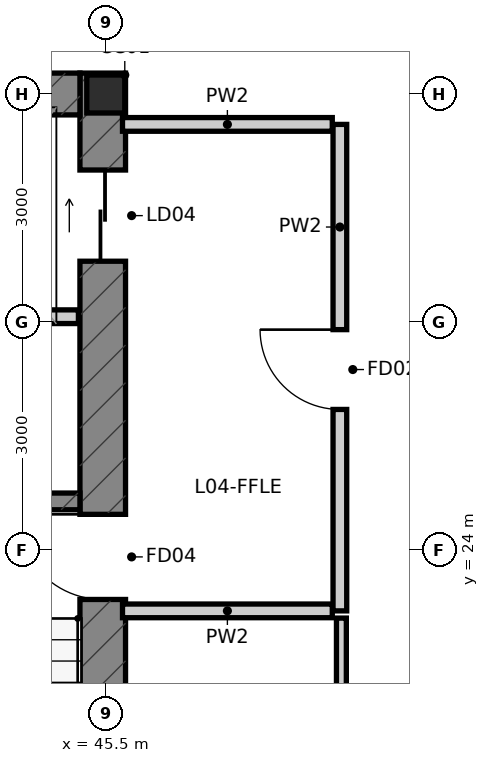
"""IFC4 building model, lengths in metres.
Left out: names, types, materials, properties, quantities, classifications, styles, units other than length and angle.
Written with IfcOpenShell. Run it as: python <this file> out.ifc"""

import sys

from ifc_helpers import new_model, si_unit, direction, frame, frame_2d, origin, origin_2d, place, context, subcontext, project, spatial, rectangle, i_section, extrude, source, transform, mapped, element, fill, save


model = new_model("IFC4")
c1 = context("Model", 3, precision=1e-05, world=origin(), true_north=direction((0.0, 1.0)))
c2 = subcontext(c1, "Body", "Model", "MODEL_VIEW")
j1 = project(units=[si_unit("LENGTHUNIT", "METRE"), si_unit("PLANEANGLEUNIT", "RADIAN")], contexts=[c1])
p1 = place(None, origin())
s1 = spatial("IfcSite", under=j1, at=p1, CompositionType="ELEMENT")
p2 = place(p1, origin())
s2 = spatial("IfcBuilding", under=s1, at=p2, CompositionType="ELEMENT")
p3 = place(p2, frame((0.0, 0.0, 18.9)))
s3 = spatial("IfcBuildingStorey", under=s2, at=p3, CompositionType="ELEMENT", Elevation=18.9)
m1 = source(origin(), c2, "Body", "SweptSolid", [
    extrude(i_section(OverallWidth=0.5, OverallDepth=0.5, WebThickness=0.028, FlangeThickness=0.04, at=origin_2d()), origin(), (0.0, 0.0, 1.0), 4.2),
])
p4 = place(p3, frame((45.5, 30.0, 0.0), z_axis=(0.0, 0.0, 1.0), x_axis=(1.0, 0.0, 0.0)))
e1 = element("IfcColumn", 1, at=p4, inside=s3, PredefinedType="COLUMN", context=c2, shape_type="MappedRepresentation", body=[
    mapped(m1, transform((0.0, 0.0, 0.0), scale=1.0)),
])
p5 = place(p3, frame((45.46, 16.85, 0.0), z_axis=(0.0, 0.0, 1.0), x_axis=(0.0, 1.0, 0.0)))
e2 = element("IfcWall", 2, at=p5, inside=s3, PredefinedType="SHEAR", context=c2, shape_type="SweptSolid", body=[
    extrude(rectangle(XDim=13.425, YDim=0.6, at=frame_2d((6.712, 0.0))), origin(), (0.0, 0.0, 1.0), 4.2),
])
p6 = place(p5, frame((6.5, 0.0, 0.0)))
e3 = element("IfcOpeningElement", 3, at=p6, cuts=e2, PredefinedType="OPENING", context=c2, shape_type="SweptSolid", body=[
    extrude(rectangle(XDim=1.12, YDim=2.15, at=frame_2d((0.56, 1.075))), frame((0.0, 0.312, 0.0), z_axis=(0.0, -1.0, 0.0), x_axis=(1.0, 0.0, 0.0)), (0.0, 0.0, 1.0), 0.624),
])
p7 = place(p5, frame((10.95, 0.0, 0.0)))
e4 = element("IfcOpeningElement", 4, at=p7, cuts=e2, PredefinedType="OPENING", context=c2, shape_type="SweptSolid", body=[
    extrude(rectangle(XDim=1.2, YDim=2.2, at=frame_2d((0.6, 1.1))), frame((0.0, 0.312, 0.0), z_axis=(0.0, -1.0, 0.0), x_axis=(1.0, 0.0, 0.0)), (0.0, 0.0, 1.0), 0.624),
])
p8 = place(p3, frame((42.26, 30.0, 0.0), z_axis=(0.0, 0.0, 1.0), x_axis=(1.0, 0.0, 0.0)))
e5 = element("IfcWall", 5, at=p8, inside=s3, PredefinedType="SHEAR", context=c2, shape_type="SweptSolid", body=[
    extrude(rectangle(XDim=2.9, YDim=0.55, at=frame_2d((1.45, 0.0))), origin(), (0.0, 0.0, 1.0), 4.2),
])
p9 = place(p3, frame((42.26, 24.64, 0.0), z_axis=(0.0, 0.0, 1.0), x_axis=(1.0, 0.0, 0.0)))
e6 = element("IfcWall", 6, at=p9, inside=s3, PredefinedType="SHEAR", context=c2, shape_type="SweptSolid", body=[
    extrude(rectangle(XDim=2.9, YDim=0.22, at=frame_2d((1.45, 0.0))), origin(), (0.0, 0.0, 1.0), 4.2),
])
p10 = place(p3, frame((48.58, 23.2, 0.0), z_axis=(0.0, 0.0, 1.0), x_axis=(0.0, 1.0, 0.0)))
e7 = element("IfcWall", 7, at=p10, inside=s3, PredefinedType="PARTITIONING", context=c2, shape_type="SweptSolid", body=[
    extrude(rectangle(XDim=6.4, YDim=0.18, at=frame_2d((3.2, 0.0))), origin(), (0.0, 0.0, 1.0), 3.75),
])
p11 = place(p10, frame((2.65, 0.0, 0.0)))
e8 = element("IfcOpeningElement", 8, at=p11, cuts=e7, PredefinedType="OPENING", context=c2, shape_type="SweptSolid", body=[
    extrude(rectangle(XDim=1.05, YDim=2.15, at=frame_2d((0.525, 1.075))), frame((0.0, 0.102, 0.0), z_axis=(0.0, -1.0, 0.0), x_axis=(1.0, 0.0, 0.0)), (0.0, 0.0, 1.0), 0.204),
])
p12 = place(p3, frame((45.72, 23.2, 0.0), z_axis=(0.0, 0.0, 1.0), x_axis=(1.0, 0.0, 0.0)))
e9 = element("IfcWall", 9, at=p12, inside=s3, PredefinedType="PARTITIONING", context=c2, shape_type="SweptSolid", body=[
    extrude(rectangle(XDim=2.76, YDim=0.18, at=frame_2d((1.38, 0.0))), origin(), (0.0, 0.0, 1.0), 3.75),
])
p13 = place(p3, frame((45.72, 29.6, 0.0), z_axis=(0.0, 0.0, 1.0), x_axis=(1.0, 0.0, 0.0)))
e10 = element("IfcWall", 10, at=p13, inside=s3, PredefinedType="PARTITIONING", context=c2, shape_type="SweptSolid", body=[
    extrude(rectangle(XDim=2.76, YDim=0.18, at=frame_2d((1.38, 0.0))), origin(), (0.0, 0.0, 1.0), 3.124),
])
p14 = place(p3, frame((42.24, 27.07, 0.0), z_axis=(0.0, 0.0, 1.0), x_axis=(1.0, 0.0, 0.0)))
e11 = element("IfcWall", 11, at=p14, inside=s3, PredefinedType="PARTITIONING", context=c2, shape_type="SweptSolid", body=[
    extrude(rectangle(XDim=2.9, YDim=0.18, at=frame_2d((1.45, 0.0))), origin(), (0.0, 0.0, 1.0), 3.75),
])
p15 = place(p3, frame((48.6, 14.355, 0.0), z_axis=(0.0, 0.0, 1.0), x_axis=(0.0, 1.0, 0.0)))
e12 = element("IfcWall", 12, at=p15, inside=s3, PredefinedType="PARTITIONING", context=c2, shape_type="SweptSolid", body=[
    extrude(rectangle(XDim=8.75, YDim=0.13, at=frame_2d((4.375, 0.0))), origin(), (0.0, 0.0, 1.0), 3.75),
])
p16 = place(p6, origin())
e13 = element("IfcDoor", 13, at=p16, inside=s3, OperationType="SINGLE_SWING_RIGHT", PredefinedType="DOOR", context=c2, shape_type="SweptSolid", body=[
    extrude(rectangle(XDim=1.12, YDim=2.15, at=frame_2d((0.56, 1.075))), frame((0.0, 0.025, 0.0), z_axis=(0.0, -1.0, 0.0), x_axis=(1.0, 0.0, 0.0)), (0.0, 0.0, 1.0), 0.05),
])
fill(e3, e13)
p17 = place(p7, origin())
e14 = element("IfcDoor", 14, at=p17, inside=s3, OperationType="SLIDING_TO_RIGHT", PredefinedType="DOOR", context=c2, shape_type="SweptSolid", body=[
    extrude(rectangle(XDim=1.2, YDim=2.2, at=frame_2d((0.6, 1.1))), frame((0.0, 0.025, 0.0), z_axis=(0.0, -1.0, 0.0), x_axis=(1.0, 0.0, 0.0)), (0.0, 0.0, 1.0), 0.05),
])
fill(e4, e14)
p18 = place(p11, origin())
e15 = element("IfcDoor", 15, at=p18, inside=s3, OperationType="SINGLE_SWING_RIGHT", PredefinedType="DOOR", context=c2, shape_type="SweptSolid", body=[
    extrude(rectangle(XDim=1.05, YDim=2.15, at=frame_2d((0.525, 1.075))), frame((0.0, 0.025, 0.0), z_axis=(0.0, -1.0, 0.0), x_axis=(1.0, 0.0, 0.0)), (0.0, 0.0, 1.0), 0.05),
])
fill(e8, e15)
save(model, sys.argv[1])
